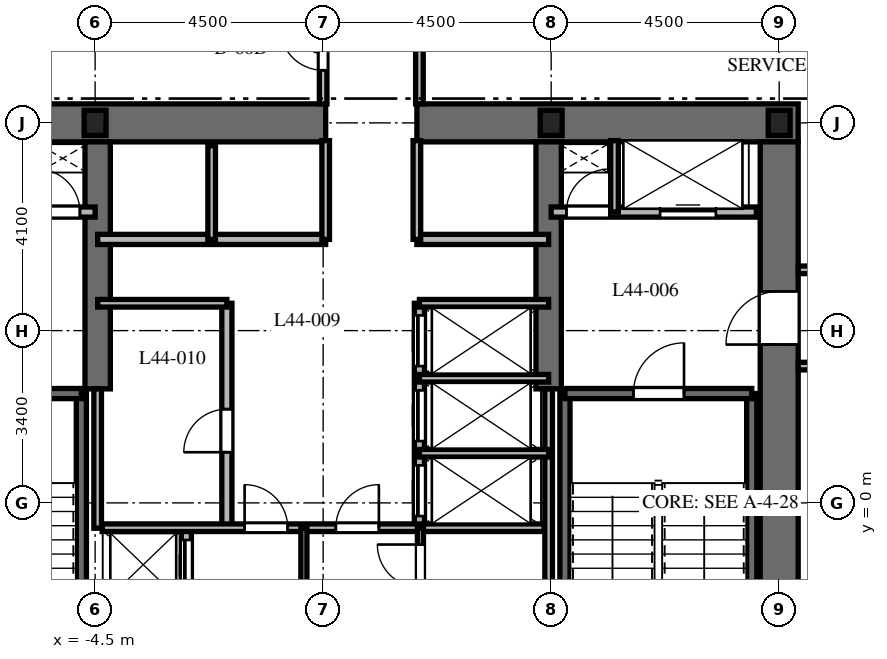
"""IFC4 building model, lengths in metres.
Left out: names, types, materials, properties, quantities, classifications, styles, units other than length and angle.
Written with IfcOpenShell. Run it as: python <this file> out.ifc"""

import sys

from ifc_helpers import new_model, si_unit, direction, frame, frame_2d, origin, origin_2d, place, context, subcontext, project, spatial, rectangle, i_section, extrude, element, fill, save


model = new_model("IFC4")
c1 = context("Model", 3, precision=1e-05, world=origin(), true_north=direction((0.0, 1.0)))
c2 = subcontext(c1, "Body", "Model", "MODEL_VIEW")
j1 = project(units=[si_unit("LENGTHUNIT", "METRE"), si_unit("PLANEANGLEUNIT", "RADIAN")], contexts=[c1])
p1 = place(None, origin())
s1 = spatial("IfcSite", under=j1, at=p1, CompositionType="ELEMENT")
p2 = place(p1, origin())
s2 = spatial("IfcBuilding", under=s1, at=p2, CompositionType="ELEMENT")
p3 = place(p2, frame((0.0, 0.0, 179.3)))
s3 = spatial("IfcBuildingStorey", under=s2, at=p3, CompositionType="ELEMENT", Elevation=179.3)
p4 = place(p3, frame((-9.375, 7.5, 0.0), z_axis=(0.0, 0.0, 1.0), x_axis=(1.0, 0.0, 0.0)))
e1 = element("IfcWall", 1, at=p4, inside=s3, PredefinedType="SHEAR", context=c2, shape_type="SweptSolid", body=[
    extrude(rectangle(XDim=9.425, YDim=0.75, at=frame_2d((4.712, 0.0))), origin(), (0.0, 0.0, 1.0), 3.7),
])
p5 = place(p3, frame((1.85, 7.5, 0.0), z_axis=(0.0, 0.0, 1.0), x_axis=(1.0, 0.0, 0.0)))
e2 = element("IfcWall", 2, at=p5, inside=s3, PredefinedType="SHEAR", context=c2, shape_type="SweptSolid", body=[
    extrude(rectangle(XDim=7.525, YDim=0.75, at=frame_2d((3.762, 0.0))), origin(), (0.0, 0.0, 1.0), 3.7),
])
p6 = place(p3, frame((9.0, -7.125, 0.0), z_axis=(0.0, 0.0, 1.0), x_axis=(0.0, 1.0, 0.0)))
e3 = element("IfcWall", 3, at=p6, inside=s3, PredefinedType="SHEAR", context=c2, shape_type="SweptSolid", body=[
    extrude(rectangle(XDim=14.25, YDim=0.75, at=frame_2d((7.125, 0.0))), origin(), (0.0, 0.0, 1.0), 3.7),
])
p7 = place(p6, frame((10.25, 0.0, 0.0)))
e4 = element("IfcOpeningElement", 4, at=p7, cuts=e3, PredefinedType="OPENING", context=c2, shape_type="SweptSolid", body=[
    extrude(rectangle(XDim=1.05, YDim=2.15, at=frame_2d((0.525, 1.075))), frame((0.0, 0.385, 0.0), z_axis=(0.0, -1.0, 0.0), x_axis=(1.0, 0.0, 0.0)), (0.0, 0.0, 1.0), 0.77),
])
for number, where, z_axis, x_axis in (
    (5, (-4.45, 2.25, 0.0), (0.0, 0.0, 1.0), (0.0, 1.0, 0.0)),
    (6, (4.45, 2.25, 0.0), (0.0, 0.0, 1.0), (0.0, 1.0, 0.0)),
):
    element("IfcWall", number, at=place(p3, frame(where, z_axis=z_axis, x_axis=x_axis)), inside=s3, PredefinedType="SHEAR", context=c2, shape_type="SweptSolid", body=[
        extrude(rectangle(XDim=4.875, YDim=0.5, at=frame_2d((2.438, 0.0))), origin(), (0.0, 0.0, 1.0), 3.7),
    ])
p8 = place(p3, frame((-4.772, -6.985, 0.0), z_axis=(0.0, 0.0, 1.0), x_axis=(0.0, 1.0, 0.0)))
e7 = element("IfcWall", 7, at=p8, inside=s3, PredefinedType="SHEAR", context=c2, shape_type="SweptSolid", body=[
    extrude(rectangle(XDim=9.143, YDim=0.2, at=frame_2d((4.572, 0.0))), origin(), (0.0, 0.0, 1.0), 3.7),
])
p9 = place(p3, frame((-8.458, 2.158, 0.0), z_axis=(0.0, 0.0, 1.0), x_axis=(1.0, 0.0, 0.0)))
e8 = element("IfcWall", 8, at=p9, inside=s3, PredefinedType="SHEAR", context=c2, shape_type="SweptSolid", body=[
    extrude(rectangle(XDim=3.686, YDim=0.2, at=frame_2d((1.843, 0.0))), origin(), (0.0, 0.0, 1.0), 3.7),
])
p10 = place(p9, frame((1.3, 0.0, 0.0)))
e9 = element("IfcOpeningElement", 9, at=p10, cuts=e8, PredefinedType="OPENING", context=c2, shape_type="SweptSolid", body=[
    extrude(rectangle(XDim=1.0, YDim=2.15, at=frame_2d((0.5, 1.075))), frame((0.0, 0.11, 0.0), z_axis=(0.0, -1.0, 0.0), x_axis=(1.0, 0.0, 0.0)), (0.0, 0.0, 1.0), 0.22),
])
for number, where, z_axis, x_axis in (
    (10, (4.772, -6.985, 0.0), (0.0, 0.0, 1.0), (0.0, 1.0, 0.0)),
    (11, (8.458, -6.985, 0.0), (0.0, 0.0, 1.0), (0.0, 1.0, 0.0)),
):
    element("IfcWall", number, at=place(p3, frame(where, z_axis=z_axis, x_axis=x_axis)), inside=s3, PredefinedType="SHEAR", context=c2, shape_type="SweptSolid", body=[
        extrude(rectangle(XDim=9.143, YDim=0.2, at=frame_2d((4.572, 0.0))), origin(), (0.0, 0.0, 1.0), 3.7),
    ])
p11 = place(p3, frame((4.772, 2.158, 0.0), z_axis=(0.0, 0.0, 1.0), x_axis=(1.0, 0.0, 0.0)))
e12 = element("IfcWall", 12, at=p11, inside=s3, PredefinedType="SHEAR", context=c2, shape_type="SweptSolid", body=[
    extrude(rectangle(XDim=3.686, YDim=0.2, at=frame_2d((1.843, 0.0))), origin(), (0.0, 0.0, 1.0), 3.7),
])
p12 = place(p11, frame((1.35, 0.0, 0.0)))
e13 = element("IfcOpeningElement", 13, at=p12, cuts=e12, PredefinedType="OPENING", context=c2, shape_type="SweptSolid", body=[
    extrude(rectangle(XDim=1.0, YDim=2.15, at=frame_2d((0.5, 1.075))), frame((0.0, 0.11, 0.0), z_axis=(0.0, -1.0, 0.0), x_axis=(1.0, 0.0, 0.0)), (0.0, 0.0, 1.0), 0.22),
])
for number, where, z_axis, x_axis in (
    (14, (9.0, 7.5, 0.0), (0.0, 0.0, 1.0), (1.0, 0.0, 0.0)),
    (15, (4.5, 7.5, 0.0), (0.0, 0.0, 1.0), (1.0, 0.0, 0.0)),
    (16, (-4.5, 7.5, 0.0), (0.0, 0.0, 1.0), (1.0, 0.0, 0.0)),
):
    element("IfcColumn", number, at=place(p3, frame(where, z_axis=z_axis, x_axis=x_axis)), inside=s3, PredefinedType="COLUMN", context=c2, shape_type="SweptSolid", body=[
        extrude(i_section(OverallWidth=0.432, OverallDepth=0.498, WebThickness=0.056, FlangeThickness=0.089, at=origin_2d()), origin(), (0.0, 0.0, 1.0), 3.7),
    ])
p13 = place(p3, frame((-8.55, 5.74, 0.0), z_axis=(0.0, 0.0, 1.0), x_axis=(1.0, 0.0, 0.0)))
e17 = element("IfcWall", 17, at=p13, inside=s3, PredefinedType="PARTITIONING", context=c2, shape_type="SweptSolid", body=[
    extrude(rectangle(XDim=4.05, YDim=0.2, at=frame_2d((2.025, 0.0))), origin(), (0.0, 0.0, 1.0), 3.4),
])
p14 = place(p13, frame((0.75, 0.0, 0.0)))
e18 = element("IfcOpeningElement", 18, at=p14, cuts=e17, PredefinedType="OPENING", context=c2, shape_type="SweptSolid", body=[
    extrude(rectangle(XDim=1.1, YDim=2.2, at=frame_2d((0.55, 1.1))), frame((0.0, 0.11, 0.0), z_axis=(0.0, -1.0, 0.0), x_axis=(1.0, 0.0, 0.0)), (0.0, 0.0, 1.0), 0.22),
])
p15 = place(p13, frame((2.9, 0.0, 0.0)))
e19 = element("IfcOpeningElement", 19, at=p15, cuts=e17, PredefinedType="OPENING", context=c2, shape_type="SweptSolid", body=[
    extrude(rectangle(XDim=0.85, YDim=2.03, at=frame_2d((0.425, 1.015))), frame((0.0, 0.11, 0.0), z_axis=(0.0, -1.0, 0.0), x_axis=(1.0, 0.0, 0.0)), (0.0, 0.0, 1.0), 0.22),
])
p16 = place(p3, frame((4.5, 5.74, 0.0), z_axis=(0.0, 0.0, 1.0), x_axis=(1.0, 0.0, 0.0)))
e20 = element("IfcWall", 20, at=p16, inside=s3, PredefinedType="PARTITIONING", context=c2, shape_type="SweptSolid", body=[
    extrude(rectangle(XDim=4.05, YDim=0.2, at=frame_2d((2.025, 0.0))), origin(), (0.0, 0.0, 1.0), 3.4),
])
p17 = place(p16, frame((0.3, 0.0, 0.0)))
e21 = element("IfcOpeningElement", 21, at=p17, cuts=e20, PredefinedType="OPENING", context=c2, shape_type="SweptSolid", body=[
    extrude(rectangle(XDim=0.85, YDim=2.03, at=frame_2d((0.425, 1.015))), frame((0.0, 0.11, 0.0), z_axis=(0.0, -1.0, 0.0), x_axis=(1.0, 0.0, 0.0)), (0.0, 0.0, 1.0), 0.22),
])
p18 = place(p16, frame((2.15, 0.0, 0.0)))
e22 = element("IfcOpeningElement", 22, at=p18, cuts=e20, PredefinedType="OPENING", context=c2, shape_type="SweptSolid", body=[
    extrude(rectangle(XDim=1.1, YDim=2.2, at=frame_2d((0.55, 1.1))), frame((0.0, 0.11, 0.0), z_axis=(0.0, -1.0, 0.0), x_axis=(1.0, 0.0, 0.0)), (0.0, 0.0, 1.0), 0.22),
])
p19 = place(p3, frame((5.75, 5.74, 0.0), z_axis=(0.0, 0.0, 1.0), x_axis=(0.0, 1.0, 0.0)))
e23 = element("IfcWall", 23, at=p19, inside=s3, PredefinedType="PARTITIONING", context=c2, shape_type="SweptSolid", body=[
    extrude(rectangle(XDim=1.41, YDim=0.15, at=frame_2d((0.705, 0.0))), origin(), (0.0, 0.0, 1.0), 3.4),
])
p20 = place(p3, frame((-2.7, -1.972, 0.0), z_axis=(0.0, 0.0, 1.0), x_axis=(0.0, 1.0, 0.0)))
e24 = element("IfcWall", 24, at=p20, inside=s3, PredefinedType="PARTITIONING", context=c2, shape_type="SweptSolid", body=[
    extrude(rectangle(XDim=1.472, YDim=0.2, at=frame_2d((0.736, 0.0))), origin(), (0.0, 0.0, 1.0), 3.4),
])
p21 = place(p20, frame((0.24, 0.0, 0.0)))
e25 = element("IfcOpeningElement", 25, at=p21, cuts=e24, PredefinedType="OPENING", context=c2, shape_type="SweptSolid", body=[
    extrude(rectangle(XDim=1.0, YDim=2.2, at=frame_2d((0.5, 1.1))), frame((0.0, 0.11, 0.0), z_axis=(0.0, -1.0, 0.0), x_axis=(1.0, 0.0, 0.0)), (0.0, 0.0, 1.0), 0.22),
])
p22 = place(p3, frame((-4.45, 5.2, 0.0), z_axis=(0.0, 0.0, 1.0), x_axis=(1.0, 0.0, 0.0)))
e26 = element("IfcWall", 26, at=p22, inside=s3, PredefinedType="PARTITIONING", context=c2, shape_type="SweptSolid", body=[
    extrude(rectangle(XDim=4.5, YDim=0.2, at=frame_2d((2.25, 0.0))), origin(), (0.0, 0.0, 1.0), 3.4),
])
p23 = place(p3, frame((1.85, 5.2, 0.0), z_axis=(0.0, 0.0, 1.0), x_axis=(1.0, 0.0, 0.0)))
e27 = element("IfcWall", 27, at=p23, inside=s3, PredefinedType="PARTITIONING", context=c2, shape_type="SweptSolid", body=[
    extrude(rectangle(XDim=2.6, YDim=0.2, at=frame_2d((1.3, 0.0))), origin(), (0.0, 0.0, 1.0), 3.4),
])
p24 = place(p3, frame((-2.2, 5.2, 0.0), z_axis=(0.0, 0.0, 1.0), x_axis=(0.0, 1.0, 0.0)))
e28 = element("IfcWall", 28, at=p24, inside=s3, PredefinedType="PARTITIONING", context=c2, shape_type="SweptSolid", body=[
    extrude(rectangle(XDim=1.85, YDim=0.15, at=frame_2d((0.925, 0.0))), origin(), (0.0, 0.0, 1.0), 3.4),
])
for number, where, z_axis, x_axis in (
    (29, (0.05, 5.2, 0.0), (0.0, 0.0, 1.0), (0.0, 1.0, 0.0)),
    (30, (1.85, 5.2, 0.0), (0.0, 0.0, 1.0), (0.0, 1.0, 0.0)),
):
    element("IfcWall", number, at=place(p3, frame(where, z_axis=z_axis, x_axis=x_axis)), inside=s3, PredefinedType="PARTITIONING", context=c2, shape_type="SweptSolid", body=[
        extrude(rectangle(XDim=1.95, YDim=0.15, at=frame_2d((0.975, 0.0))), origin(), (0.0, 0.0, 1.0), 3.4),
    ])
p25 = place(p3, frame((-4.45, -0.5, 0.0), z_axis=(0.0, 0.0, 1.0), x_axis=(0.0, 1.0, 0.0)))
e31 = element("IfcWall", 31, at=p25, inside=s3, PredefinedType="PARTITIONING", context=c2, shape_type="SweptSolid", body=[
    extrude(rectangle(XDim=2.75, YDim=0.15, at=frame_2d((1.375, 0.0))), origin(), (0.0, 0.0, 1.0), 3.4),
])
p26 = place(p3, frame((4.45, -1.972, 0.0), z_axis=(0.0, 0.0, 1.0), x_axis=(0.0, 1.0, 0.0)))
e32 = element("IfcWall", 32, at=p26, inside=s3, PredefinedType="PARTITIONING", context=c2, shape_type="SweptSolid", body=[
    extrude(rectangle(XDim=4.222, YDim=0.15, at=frame_2d((2.111, 0.0))), origin(), (0.0, 0.0, 1.0), 3.4),
])
p27 = place(p3, frame((-1.9, -0.5, 0.0), z_axis=(0.0, 0.0, 1.0), x_axis=(0.0, 1.0, 0.0)))
e33 = element("IfcWall", 33, at=p27, inside=s3, PredefinedType="PARTITIONING", context=c2, shape_type="SweptSolid", body=[
    extrude(rectangle(XDim=4.44, YDim=0.2, at=frame_2d((2.22, 0.0))), origin(), (0.0, 0.0, 1.0), 3.4),
])
p28 = place(p27, frame((1.5, 0.0, 0.0)))
e34 = element("IfcOpeningElement", 34, at=p28, cuts=e33, PredefinedType="OPENING", context=c2, shape_type="SweptSolid", body=[
    extrude(rectangle(XDim=0.85, YDim=2.03, at=frame_2d((0.425, 1.015))), frame((0.0, 0.11, 0.0), z_axis=(0.0, -1.0, 0.0), x_axis=(1.0, 0.0, 0.0)), (0.0, 0.0, 1.0), 0.22),
])
p29 = place(p3, frame((-4.45, 3.94, 0.0), z_axis=(0.0, 0.0, 1.0), x_axis=(1.0, 0.0, 0.0)))
e35 = element("IfcWall", 35, at=p29, inside=s3, PredefinedType="PARTITIONING", context=c2, shape_type="SweptSolid", body=[
    extrude(rectangle(XDim=2.55, YDim=0.15, at=frame_2d((1.275, 0.0))), origin(), (0.0, 0.0, 1.0), 3.4),
])
p30 = place(p3, frame((1.9, -0.5, 0.0), z_axis=(0.0, 0.0, 1.0), x_axis=(0.0, 1.0, 0.0)))
e36 = element("IfcWall", 36, at=p30, inside=s3, PredefinedType="PARTITIONING", context=c2, shape_type="SweptSolid", body=[
    extrude(rectangle(XDim=4.44, YDim=0.2, at=frame_2d((2.22, 0.0))), origin(), (0.0, 0.0, 1.0), 3.4),
])
p31 = place(p30, frame((0.24, 0.0, 0.0)))
e37 = element("IfcOpeningElement", 37, at=p31, cuts=e36, PredefinedType="OPENING", context=c2, shape_type="SweptSolid", body=[
    extrude(rectangle(XDim=1.0, YDim=2.2, at=frame_2d((0.5, 1.1))), frame((0.0, 0.11, 0.0), z_axis=(0.0, -1.0, 0.0), x_axis=(1.0, 0.0, 0.0)), (0.0, 0.0, 1.0), 0.22),
])
p32 = place(p30, frame((1.72, 0.0, 0.0)))
e38 = element("IfcOpeningElement", 38, at=p32, cuts=e36, PredefinedType="OPENING", context=c2, shape_type="SweptSolid", body=[
    extrude(rectangle(XDim=1.0, YDim=2.2, at=frame_2d((0.5, 1.1))), frame((0.0, 0.11, 0.0), z_axis=(0.0, -1.0, 0.0), x_axis=(1.0, 0.0, 0.0)), (0.0, 0.0, 1.0), 0.22),
])
p33 = place(p30, frame((3.2, 0.0, 0.0)))
e39 = element("IfcOpeningElement", 39, at=p33, cuts=e36, PredefinedType="OPENING", context=c2, shape_type="SweptSolid", body=[
    extrude(rectangle(XDim=1.0, YDim=2.2, at=frame_2d((0.5, 1.1))), frame((0.0, 0.11, 0.0), z_axis=(0.0, -1.0, 0.0), x_axis=(1.0, 0.0, 0.0)), (0.0, 0.0, 1.0), 0.22),
])
for number, where, z_axis, x_axis in (
    (40, (1.9, 3.94, 0.0), (0.0, 0.0, 1.0), (1.0, 0.0, 0.0)),
    (41, (1.9, 0.98, 0.0), (0.0, 0.0, 1.0), (1.0, 0.0, 0.0)),
    (42, (1.9, 2.46, 0.0), (0.0, 0.0, 1.0), (1.0, 0.0, 0.0)),
):
    element("IfcWall", number, at=place(p3, frame(where, z_axis=z_axis, x_axis=x_axis)), inside=s3, PredefinedType="PARTITIONING", context=c2, shape_type="SweptSolid", body=[
        extrude(rectangle(XDim=2.55, YDim=0.15, at=frame_2d((1.275, 0.0))), origin(), (0.0, 0.0, 1.0), 3.4),
    ])
p34 = place(p3, frame((-4.36, -0.49, 0.0), z_axis=(0.0, 0.0, 1.0), x_axis=(1.0, 0.0, 0.0)))
e43 = element("IfcWall", 43, at=p34, inside=s3, PredefinedType="PARTITIONING", context=c2, shape_type="SweptSolid", body=[
    extrude(rectangle(XDim=8.72, YDim=0.15, at=frame_2d((4.36, 0.0))), origin(), (0.0, 0.0, 1.0), 3.4),
])
p35 = place(p34, frame((2.81, 0.0, 0.0)))
e44 = element("IfcOpeningElement", 44, at=p35, cuts=e43, PredefinedType="OPENING", context=c2, shape_type="SweptSolid", body=[
    extrude(rectangle(XDim=0.85, YDim=2.03, at=frame_2d((0.425, 1.015))), frame((0.0, 0.085, 0.0), z_axis=(0.0, -1.0, 0.0), x_axis=(1.0, 0.0, 0.0)), (0.0, 0.0, 1.0), 0.17),
])
p36 = place(p34, frame((4.61, 0.0, 0.0)))
e45 = element("IfcOpeningElement", 45, at=p36, cuts=e43, PredefinedType="OPENING", context=c2, shape_type="SweptSolid", body=[
    extrude(rectangle(XDim=0.85, YDim=2.03, at=frame_2d((0.425, 1.015))), frame((0.0, 0.085, 0.0), z_axis=(0.0, -1.0, 0.0), x_axis=(1.0, 0.0, 0.0)), (0.0, 0.0, 1.0), 0.17),
])
p37 = place(p3, frame((-0.38, -1.972, 0.0), z_axis=(0.0, 0.0, 1.0), x_axis=(0.0, 1.0, 0.0)))
e46 = element("IfcWall", 46, at=p37, inside=s3, PredefinedType="PARTITIONING", context=c2, shape_type="SweptSolid", body=[
    extrude(rectangle(XDim=1.472, YDim=0.12, at=frame_2d((0.736, 0.0))), origin(), (0.0, 0.0, 1.0), 3.4),
])
p38 = place(p3, frame((1.92, -1.972, 0.0), z_axis=(0.0, 0.0, 1.0), x_axis=(0.0, 1.0, 0.0)))
e47 = element("IfcWall", 47, at=p38, inside=s3, PredefinedType="PARTITIONING", context=c2, shape_type="SweptSolid", body=[
    extrude(rectangle(XDim=1.472, YDim=0.12, at=frame_2d((0.736, 0.0))), origin(), (0.0, 0.0, 1.0), 3.4),
])
p39 = place(p38, frame((0.3, 0.0, 0.0)))
e48 = element("IfcOpeningElement", 48, at=p39, cuts=e47, PredefinedType="OPENING", context=c2, shape_type="SweptSolid", body=[
    extrude(rectangle(XDim=0.85, YDim=2.03, at=frame_2d((0.425, 1.015))), frame((0.0, 0.07, 0.0), z_axis=(0.0, -1.0, 0.0), x_axis=(1.0, 0.0, 0.0)), (0.0, 0.0, 1.0), 0.14),
])
p40 = place(p3, frame((11.55, 2.7, 0.0), z_axis=(0.0, 0.0, 1.0), x_axis=(-1.0, 0.0, 0.0)))
e49 = element("IfcWall", 49, at=p40, inside=s3, PredefinedType="PARTITIONING", context=c2, shape_type="SweptSolid", body=[
    extrude(rectangle(XDim=2.175, YDim=0.15, at=frame_2d((1.087, 0.0))), origin(), (0.0, 0.0, 1.0), 3.4),
])
p41 = place(p3, frame((9.375, 4.6, 0.0), z_axis=(0.0, 0.0, 1.0), x_axis=(1.0, 0.0, 0.0)))
e50 = element("IfcWall", 50, at=p41, inside=s3, PredefinedType="PARTITIONING", context=c2, shape_type="SweptSolid", body=[
    extrude(rectangle(XDim=2.175, YDim=0.15, at=frame_2d((1.087, 0.0))), origin(), (0.0, 0.0, 1.0), 3.4),
])
p42 = place(p41, frame((0.663, 0.0, 0.0)))
e51 = element("IfcOpeningElement", 51, at=p42, cuts=e50, PredefinedType="OPENING", context=c2, shape_type="SweptSolid", body=[
    extrude(rectangle(XDim=0.85, YDim=2.03, at=frame_2d((0.425, 1.015))), frame((0.0, 0.085, 0.0), z_axis=(0.0, -1.0, 0.0), x_axis=(1.0, 0.0, 0.0)), (0.0, 0.0, 1.0), 0.17),
])
p43 = place(p3, frame((1.9, 10.05, 0.0), z_axis=(0.0, 0.0, 1.0), x_axis=(0.0, -1.0, 0.0)))
e52 = element("IfcWall", 52, at=p43, inside=s3, PredefinedType="PARTITIONING", context=c2, shape_type="SweptSolid", body=[
    extrude(rectangle(XDim=2.175, YDim=0.15, at=frame_2d((1.087, 0.0))), origin(), (0.0, 0.0, 1.0), 3.4),
])
p44 = place(p3, frame((0.0, 7.875, 0.0), z_axis=(0.0, 0.0, 1.0), x_axis=(0.0, 1.0, 0.0)))
e53 = element("IfcWall", 53, at=p44, inside=s3, PredefinedType="PARTITIONING", context=c2, shape_type="SweptSolid", body=[
    extrude(rectangle(XDim=2.175, YDim=0.15, at=frame_2d((1.087, 0.0))), origin(), (0.0, 0.0, 1.0), 3.4),
])
p45 = place(p44, frame((0.663, 0.0, 0.0)))
e54 = element("IfcOpeningElement", 54, at=p45, cuts=e53, PredefinedType="OPENING", context=c2, shape_type="SweptSolid", body=[
    extrude(rectangle(XDim=0.85, YDim=2.03, at=frame_2d((0.425, 1.015))), frame((0.0, 0.085, 0.0), z_axis=(0.0, -1.0, 0.0), x_axis=(1.0, 0.0, 0.0)), (0.0, 0.0, 1.0), 0.17),
])
p46 = place(p12, origin())
e55 = element("IfcDoor", 55, at=p46, inside=s3, OperationType="SINGLE_SWING_RIGHT", PredefinedType="DOOR", context=c2, shape_type="SweptSolid", body=[
    extrude(rectangle(XDim=1.0, YDim=2.15, at=frame_2d((0.5, 1.075))), frame((0.0, 0.025, 0.0), z_axis=(0.0, -1.0, 0.0), x_axis=(1.0, 0.0, 0.0)), (0.0, 0.0, 1.0), 0.05),
])
fill(e13, e55)
p47 = place(p7, origin())
e56 = element("IfcDoor", 56, at=p47, inside=s3, OperationType="SINGLE_SWING_LEFT", PredefinedType="DOOR", context=c2, shape_type="SweptSolid", body=[
    extrude(rectangle(XDim=1.05, YDim=2.15, at=frame_2d((0.525, 1.075))), frame((0.0, 0.025, 0.0), z_axis=(0.0, -1.0, 0.0), x_axis=(1.0, 0.0, 0.0)), (0.0, 0.0, 1.0), 0.05),
])
fill(e4, e56)
p48 = place(p15, origin())
e57 = element("IfcDoor", 57, at=p48, inside=s3, OperationType="SINGLE_SWING_LEFT", PredefinedType="DOOR", context=c2, shape_type="SweptSolid", body=[
    extrude(rectangle(XDim=0.85, YDim=2.03, at=frame_2d((0.425, 1.015))), frame((0.0, 0.025, 0.0), z_axis=(0.0, -1.0, 0.0), x_axis=(1.0, 0.0, 0.0)), (0.0, 0.0, 1.0), 0.05),
])
fill(e19, e57)
p49 = place(p17, origin())
e58 = element("IfcDoor", 58, at=p49, inside=s3, OperationType="SINGLE_SWING_RIGHT", PredefinedType="DOOR", context=c2, shape_type="SweptSolid", body=[
    extrude(rectangle(XDim=0.85, YDim=2.03, at=frame_2d((0.425, 1.015))), frame((0.0, 0.025, 0.0), z_axis=(0.0, -1.0, 0.0), x_axis=(1.0, 0.0, 0.0)), (0.0, 0.0, 1.0), 0.05),
])
fill(e21, e58)
p50 = place(p18, origin())
e59 = element("IfcDoor", 59, at=p50, inside=s3, OperationType="SLIDING_TO_RIGHT", PredefinedType="DOOR", context=c2, shape_type="SweptSolid", body=[
    extrude(rectangle(XDim=1.1, YDim=2.2, at=frame_2d((0.55, 1.1))), frame((0.0, 0.025, 0.0), z_axis=(0.0, -1.0, 0.0), x_axis=(1.0, 0.0, 0.0)), (0.0, 0.0, 1.0), 0.05),
])
fill(e22, e59)
p51 = place(p21, origin())
e60 = element("IfcDoor", 60, at=p51, inside=s3, OperationType="SLIDING_TO_LEFT", PredefinedType="DOOR", context=c2, shape_type="SweptSolid", body=[
    extrude(rectangle(XDim=1.0, YDim=2.2, at=frame_2d((0.5, 1.1))), frame((0.0, 0.025, 0.0), z_axis=(0.0, -1.0, 0.0), x_axis=(1.0, 0.0, 0.0)), (0.0, 0.0, 1.0), 0.05),
])
fill(e25, e60)
p52 = place(p28, origin())
e61 = element("IfcDoor", 61, at=p52, inside=s3, OperationType="SINGLE_SWING_LEFT", PredefinedType="DOOR", context=c2, shape_type="SweptSolid", body=[
    extrude(rectangle(XDim=0.85, YDim=2.03, at=frame_2d((0.425, 1.015))), frame((0.0, 0.025, 0.0), z_axis=(0.0, -1.0, 0.0), x_axis=(1.0, 0.0, 0.0)), (0.0, 0.0, 1.0), 0.05),
])
fill(e34, e61)
p53 = place(p31, origin())
e62 = element("IfcDoor", 62, at=p53, inside=s3, OperationType="SLIDING_TO_RIGHT", PredefinedType="DOOR", context=c2, shape_type="SweptSolid", body=[
    extrude(rectangle(XDim=1.0, YDim=2.2, at=frame_2d((0.5, 1.1))), frame((0.0, 0.025, 0.0), z_axis=(0.0, -1.0, 0.0), x_axis=(1.0, 0.0, 0.0)), (0.0, 0.0, 1.0), 0.05),
])
fill(e37, e62)
p54 = place(p32, origin())
e63 = element("IfcDoor", 63, at=p54, inside=s3, OperationType="SLIDING_TO_RIGHT", PredefinedType="DOOR", context=c2, shape_type="SweptSolid", body=[
    extrude(rectangle(XDim=1.0, YDim=2.2, at=frame_2d((0.5, 1.1))), frame((0.0, 0.025, 0.0), z_axis=(0.0, -1.0, 0.0), x_axis=(1.0, 0.0, 0.0)), (0.0, 0.0, 1.0), 0.05),
])
fill(e38, e63)
p55 = place(p33, origin())
e64 = element("IfcDoor", 64, at=p55, inside=s3, OperationType="SLIDING_TO_RIGHT", PredefinedType="DOOR", context=c2, shape_type="SweptSolid", body=[
    extrude(rectangle(XDim=1.0, YDim=2.2, at=frame_2d((0.5, 1.1))), frame((0.0, 0.025, 0.0), z_axis=(0.0, -1.0, 0.0), x_axis=(1.0, 0.0, 0.0)), (0.0, 0.0, 1.0), 0.05),
])
fill(e39, e64)
p56 = place(p35, origin())
e65 = element("IfcDoor", 65, at=p56, inside=s3, OperationType="SINGLE_SWING_LEFT", PredefinedType="DOOR", context=c2, shape_type="SweptSolid", body=[
    extrude(rectangle(XDim=0.85, YDim=2.03, at=frame_2d((0.425, 1.015))), frame((0.0, 0.025, 0.0), z_axis=(0.0, -1.0, 0.0), x_axis=(1.0, 0.0, 0.0)), (0.0, 0.0, 1.0), 0.05),
])
fill(e44, e65)
p57 = place(p36, origin())
e66 = element("IfcDoor", 66, at=p57, inside=s3, OperationType="SINGLE_SWING_RIGHT", PredefinedType="DOOR", context=c2, shape_type="SweptSolid", body=[
    extrude(rectangle(XDim=0.85, YDim=2.03, at=frame_2d((0.425, 1.015))), frame((0.0, 0.025, 0.0), z_axis=(0.0, -1.0, 0.0), x_axis=(1.0, 0.0, 0.0)), (0.0, 0.0, 1.0), 0.05),
])
fill(e45, e66)
p58 = place(p39, origin())
e67 = element("IfcDoor", 67, at=p58, inside=s3, OperationType="SINGLE_SWING_RIGHT", PredefinedType="DOOR", context=c2, shape_type="SweptSolid", body=[
    extrude(rectangle(XDim=0.85, YDim=2.03, at=frame_2d((0.425, 1.015))), frame((0.0, 0.025, 0.0), z_axis=(0.0, -1.0, 0.0), x_axis=(1.0, 0.0, 0.0)), (0.0, 0.0, 1.0), 0.05),
])
fill(e48, e67)
p59 = place(p45, origin())
e68 = element("IfcDoor", 68, at=p59, inside=s3, OperationType="SINGLE_SWING_RIGHT", PredefinedType="DOOR", context=c2, shape_type="SweptSolid", body=[
    extrude(rectangle(XDim=0.85, YDim=2.03, at=frame_2d((0.425, 1.015))), frame((0.0, 0.025, 0.0), z_axis=(0.0, -1.0, 0.0), x_axis=(1.0, 0.0, 0.0)), (0.0, 0.0, 1.0), 0.05),
])
fill(e54, e68)
save(model, sys.argv[1])
